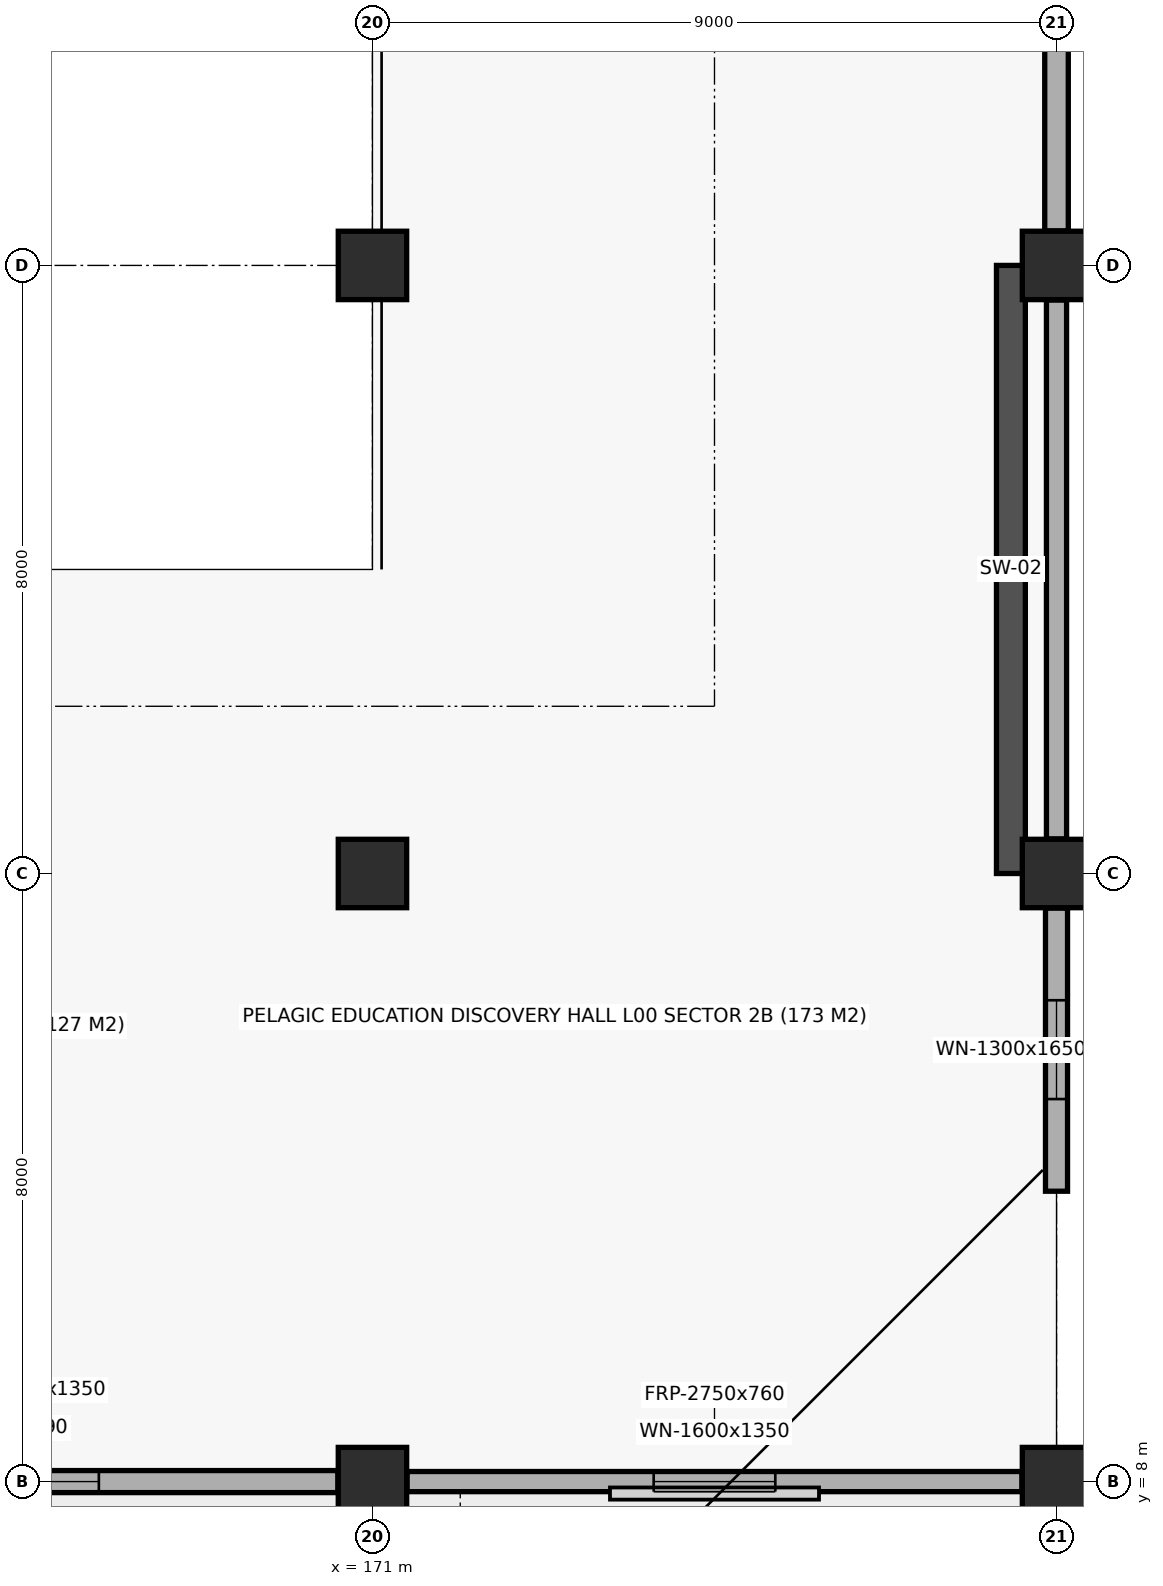
"""IFC4 building model, lengths in metres.
Left out: names, types, materials, properties, quantities, classifications, styles, units other than length and angle.
Written with IfcOpenShell. Run it as: python <this file> out.ifc"""

import sys

from ifc_helpers import new_model, si_unit, direction, frame, frame_2d, origin, origin_2d, place, context, subcontext, project, spatial, rectangle, extrude, element, fill, save


model = new_model("IFC4")
c1 = context("Model", 3, precision=1e-05, world=origin(), true_north=direction((0.0, 1.0)))
c2 = subcontext(c1, "Body", "Model", "MODEL_VIEW")
j1 = project(units=[si_unit("LENGTHUNIT", "METRE"), si_unit("PLANEANGLEUNIT", "RADIAN")], contexts=[c1])
p1 = place(None, origin())
s1 = spatial("IfcSite", under=j1, at=p1, CompositionType="ELEMENT")
p2 = place(p1, origin())
s2 = spatial("IfcBuilding", under=s1, at=p2, CompositionType="ELEMENT")
p3 = place(p2, origin())
s3 = spatial("IfcBuildingStorey", under=s2, at=p3, CompositionType="ELEMENT", Elevation=0.0)
for number, where, z_axis, x_axis in (
    (1, (171.0, 8.0, 0.0), (0.0, 0.0, 1.0), (1.0, 0.0, 0.0)),
    (2, (171.0, 16.0, 0.0), (0.0, 0.0, 1.0), (1.0, 0.0, 0.0)),
    (3, (171.0, 24.0, 0.0), (0.0, 0.0, 1.0), (1.0, 0.0, 0.0)),
    (4, (180.0, 8.0, 0.0), (0.0, 0.0, 1.0), (1.0, 0.0, 0.0)),
    (5, (180.0, 16.0, 0.0), (0.0, 0.0, 1.0), (1.0, 0.0, 0.0)),
    (6, (180.0, 24.0, 0.0), (0.0, 0.0, 1.0), (1.0, 0.0, 0.0)),
):
    element("IfcColumn", number, at=place(p3, frame(where, z_axis=z_axis, x_axis=x_axis)), inside=s3, PredefinedType="COLUMN", context=c2, shape_type="SweptSolid", body=[
        extrude(rectangle(XDim=0.9, YDim=0.9, at=origin_2d()), origin(), (0.0, 0.0, 1.0), 4.5),
    ])
p4 = place(p3, frame((179.4, 16.0, 0.0), z_axis=(0.0, 0.0, 1.0), x_axis=(0.0, 1.0, 0.0)))
e7 = element("IfcWall", 7, at=p4, inside=s3, PredefinedType="SHEAR", context=c2, shape_type="SweptSolid", body=[
    extrude(rectangle(XDim=8.0, YDim=0.38, at=frame_2d((4.0, 0.0))), origin(), (0.0, 0.0, 1.0), 3.3),
])
p5 = place(p3, frame((162.455, 8.0, 0.0), z_axis=(0.0, 0.0, 1.0), x_axis=(1.0, 0.0, 0.0)))
e8 = element("IfcWall", 8, at=p5, inside=s3, PredefinedType="STANDARD", context=c2, shape_type="SweptSolid", body=[
    extrude(rectangle(XDim=8.09, YDim=0.29, at=frame_2d((4.045, 0.0))), origin(), (0.0, 0.0, 1.0), 2.49),
])
p6 = place(p5, frame((3.145, 0.0, 0.85)))
e9 = element("IfcOpeningElement", 9, at=p6, cuts=e8, PredefinedType="OPENING", context=c2, shape_type="SweptSolid", body=[
    extrude(rectangle(XDim=1.8, YDim=1.35, at=frame_2d((0.9, 0.675))), frame((0.0, 0.157, 0.0), z_axis=(0.0, -1.0, 0.0), x_axis=(1.0, 0.0, 0.0)), (0.0, 0.0, 1.0), 0.314),
])
p7 = place(p3, frame((171.455, 8.0, 0.0), z_axis=(0.0, 0.0, 1.0), x_axis=(1.0, 0.0, 0.0)))
e10 = element("IfcWall", 10, at=p7, inside=s3, PredefinedType="STANDARD", context=c2, shape_type="SweptSolid", body=[
    extrude(rectangle(XDim=8.09, YDim=0.265, at=frame_2d((4.045, 0.0))), origin(), (0.0, 0.0, 1.0), 2.49),
])
p8 = place(p7, frame((3.245, 0.0, 0.85)))
e11 = element("IfcOpeningElement", 11, at=p8, cuts=e10, PredefinedType="OPENING", context=c2, shape_type="SweptSolid", body=[
    extrude(rectangle(XDim=1.6, YDim=1.35, at=frame_2d((0.8, 0.675))), frame((0.0, 0.145, 0.0), z_axis=(0.0, -1.0, 0.0), x_axis=(1.0, 0.0, 0.0)), (0.0, 0.0, 1.0), 0.289),
])
p9 = place(p3, frame((180.0, 11.82, 0.0), z_axis=(0.0, 0.0, 1.0), x_axis=(0.0, 1.0, 0.0)))
e12 = element("IfcWall", 12, at=p9, inside=s3, PredefinedType="STANDARD", context=c2, shape_type="SweptSolid", body=[
    extrude(rectangle(XDim=3.725, YDim=0.29, at=frame_2d((1.862, 0.0))), origin(), (0.0, 0.0, 1.0), 2.73),
])
p10 = place(p9, frame((1.212, 0.0, 0.85)))
e13 = element("IfcOpeningElement", 13, at=p10, cuts=e12, PredefinedType="OPENING", context=c2, shape_type="SweptSolid", body=[
    extrude(rectangle(XDim=1.3, YDim=1.65, at=frame_2d((0.65, 0.825))), frame((0.0, 0.157, 0.0), z_axis=(0.0, -1.0, 0.0), x_axis=(1.0, 0.0, 0.0)), (0.0, 0.0, 1.0), 0.314),
])
p11 = place(p3, frame((180.0, 16.455, 0.0), z_axis=(0.0, 0.0, 1.0), x_axis=(0.0, 1.0, 0.0)))
e14 = element("IfcWall", 14, at=p11, inside=s3, PredefinedType="STANDARD", context=c2, shape_type="SweptSolid", body=[
    extrude(rectangle(XDim=7.09, YDim=0.265, at=frame_2d((3.545, 0.0))), origin(), (0.0, 0.0, 1.0), 2.73),
])
p12 = place(p3, frame((180.0, 24.455, 0.0), z_axis=(0.0, 0.0, 1.0), x_axis=(0.0, 1.0, 0.0)))
e15 = element("IfcWall", 15, at=p12, inside=s3, PredefinedType="STANDARD", context=c2, shape_type="SweptSolid", body=[
    extrude(rectangle(XDim=7.09, YDim=0.31, at=frame_2d((3.545, 0.0))), origin(), (0.0, 0.0, 1.0), 2.73),
])
p13 = place(p12, frame((2.995, 0.0, 0.85)))
e16 = element("IfcOpeningElement", 16, at=p13, cuts=e15, PredefinedType="OPENING", context=c2, shape_type="SweptSolid", body=[
    extrude(rectangle(XDim=1.1, YDim=1.65, at=frame_2d((0.55, 0.825))), frame((0.0, 0.167, 0.0), z_axis=(0.0, -1.0, 0.0), x_axis=(1.0, 0.0, 0.0)), (0.0, 0.0, 1.0), 0.334),
])
p14 = place(p6, origin())
e17 = element("IfcWindow", 17, at=p14, inside=s3, PartitioningType="SINGLE_PANEL", PredefinedType="WINDOW", context=c2, shape_type="SweptSolid", body=[
    extrude(rectangle(XDim=1.8, YDim=1.35, at=frame_2d((0.9, 0.675))), frame((0.0, 0.03, 0.0), z_axis=(0.0, -1.0, 0.0), x_axis=(1.0, 0.0, 0.0)), (0.0, 0.0, 1.0), 0.06),
])
fill(e9, e17)
p15 = place(p8, origin())
e18 = element("IfcWindow", 18, at=p15, inside=s3, PartitioningType="SINGLE_PANEL", PredefinedType="WINDOW", context=c2, shape_type="SweptSolid", body=[
    extrude(rectangle(XDim=1.6, YDim=1.35, at=frame_2d((0.8, 0.675))), frame((0.0, 0.03, 0.0), z_axis=(0.0, -1.0, 0.0), x_axis=(1.0, 0.0, 0.0)), (0.0, 0.0, 1.0), 0.06),
])
fill(e11, e18)
p16 = place(p10, origin())
e19 = element("IfcWindow", 19, at=p16, inside=s3, PartitioningType="SINGLE_PANEL", PredefinedType="WINDOW", context=c2, shape_type="SweptSolid", body=[
    extrude(rectangle(XDim=1.3, YDim=1.65, at=frame_2d((0.65, 0.825))), frame((0.0, 0.03, 0.0), z_axis=(0.0, -1.0, 0.0), x_axis=(1.0, 0.0, 0.0)), (0.0, 0.0, 1.0), 0.06),
])
fill(e13, e19)
save(model, sys.argv[1])
